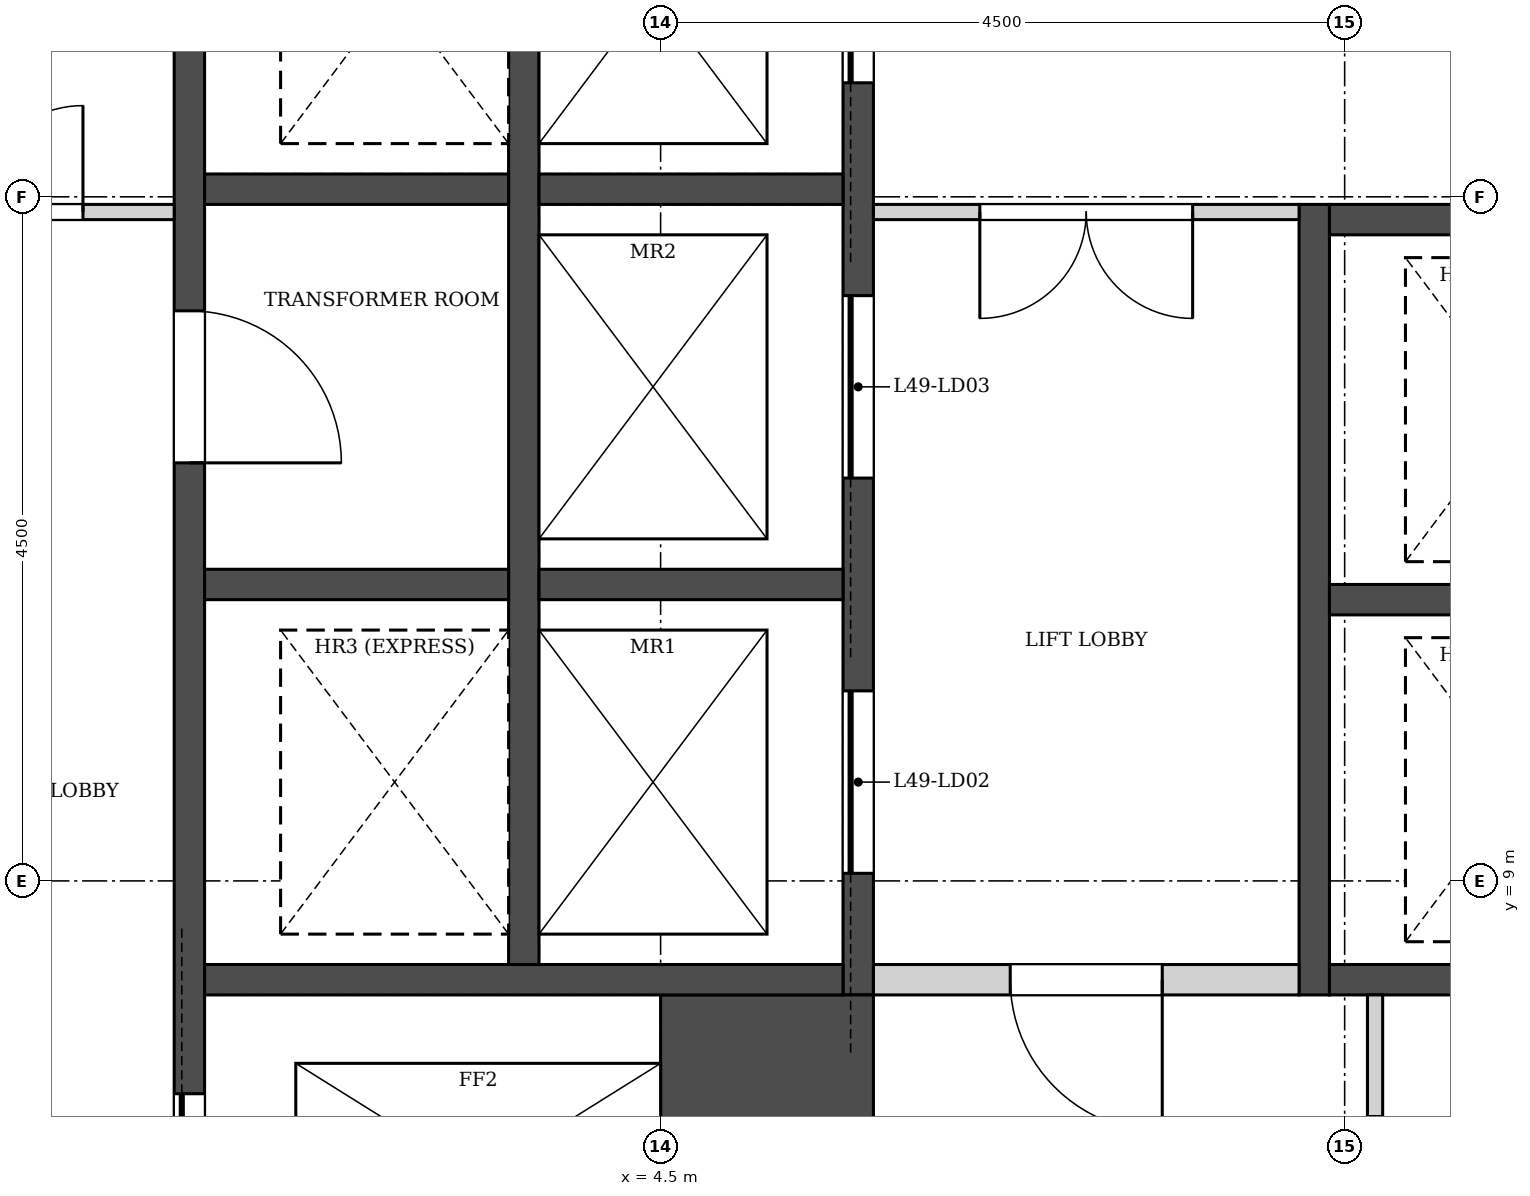
"""IFC4 building model, lengths in metres.
Left out: names, types, materials, properties, quantities, classifications, styles, units other than length and angle.
Written with IfcOpenShell. Run it as: python <this file> out.ifc"""

import sys

from ifc_helpers import new_model, si_unit, direction, frame, frame_2d, origin, place, context, subcontext, project, spatial, rectangle, extrude, element, fill, save


model = new_model("IFC4")
c1 = context("Model", 3, precision=1e-05, world=origin(), true_north=direction((0.0, 1.0)))
c2 = subcontext(c1, "Body", "Model", "MODEL_VIEW")
j1 = project(units=[si_unit("LENGTHUNIT", "METRE"), si_unit("PLANEANGLEUNIT", "RADIAN")], contexts=[c1])
p1 = place(None, origin())
s1 = spatial("IfcSite", under=j1, at=p1, CompositionType="ELEMENT")
p2 = place(p1, origin())
s2 = spatial("IfcBuilding", under=s1, at=p2, CompositionType="ELEMENT")
p3 = place(p2, frame((0.0, 0.0, 218.1)))
s3 = spatial("IfcBuildingStorey", under=s2, at=p3, CompositionType="ELEMENT", Elevation=218.1)
p4 = place(p3, frame((13.167, 10.695, 0.0), z_axis=(0.0, 0.0, 1.0), x_axis=(-0.499995021168, 0.866028278295, 0.0)))
e1 = element("IfcWall", 1, at=p4, inside=s3, PredefinedType="SHEAR", context=c2, shape_type="SweptSolid", body=[
    extrude(rectangle(XDim=8.839, YDim=1.0, at=frame_2d((4.419, 0.0))), origin(), (0.0, 0.0, 1.0), 5.4),
])
p5 = place(p3, frame((27.139, 7.709, 0.0), z_axis=(0.0, 0.0, 1.0), x_axis=(-0.500000533701, 0.866025095652, 0.0)))
e2 = element("IfcWall", 2, at=p5, inside=s3, PredefinedType="SOLIDWALL", context=c2, shape_type="SweptSolid", body=[
    extrude(rectangle(XDim=45.573, YDim=0.34, at=frame_2d((22.787, 0.0))), origin(), (0.0, 0.0, 1.0), 5.0),
])
p6 = place(p5, frame((1.893, 0.0, 0.9)))
e3 = element("IfcOpeningElement", 3, at=p6, cuts=e2, PredefinedType="OPENING", context=c2, shape_type="SweptSolid", body=[
    extrude(rectangle(XDim=1.885, YDim=3.0, at=frame_2d((0.942, 1.5))), frame((0.0, 0.18, 0.0), z_axis=(0.0, -1.0, 0.0), x_axis=(1.0, 0.0, 0.0)), (0.0, 0.0, 1.0), 0.36),
])
p7 = place(p5, frame((4.893, 0.0, 0.9)))
e4 = element("IfcOpeningElement", 4, at=p7, cuts=e2, PredefinedType="OPENING", context=c2, shape_type="SweptSolid", body=[
    extrude(rectangle(XDim=1.885, YDim=3.0, at=frame_2d((0.942, 1.5))), frame((0.0, 0.18, 0.0), z_axis=(0.0, -1.0, 0.0), x_axis=(1.0, 0.0, 0.0)), (0.0, 0.0, 1.0), 0.36),
])
p8 = place(p5, frame((7.893, 0.0, 0.9)))
e5 = element("IfcOpeningElement", 5, at=p8, cuts=e2, PredefinedType="OPENING", context=c2, shape_type="SweptSolid", body=[
    extrude(rectangle(XDim=1.885, YDim=3.0, at=frame_2d((0.942, 1.5))), frame((0.0, 0.18, 0.0), z_axis=(0.0, -1.0, 0.0), x_axis=(1.0, 0.0, 0.0)), (0.0, 0.0, 1.0), 0.36),
])
p9 = place(p5, frame((10.893, 0.0, 0.9)))
e6 = element("IfcOpeningElement", 6, at=p9, cuts=e2, PredefinedType="OPENING", context=c2, shape_type="SweptSolid", body=[
    extrude(rectangle(XDim=1.885, YDim=3.0, at=frame_2d((0.942, 1.5))), frame((0.0, 0.18, 0.0), z_axis=(0.0, -1.0, 0.0), x_axis=(1.0, 0.0, 0.0)), (0.0, 0.0, 1.0), 0.36),
])
p10 = place(p5, frame((13.893, 0.0, 0.9)))
e7 = element("IfcOpeningElement", 7, at=p10, cuts=e2, PredefinedType="OPENING", context=c2, shape_type="SweptSolid", body=[
    extrude(rectangle(XDim=1.885, YDim=3.0, at=frame_2d((0.942, 1.5))), frame((0.0, 0.18, 0.0), z_axis=(0.0, -1.0, 0.0), x_axis=(1.0, 0.0, 0.0)), (0.0, 0.0, 1.0), 0.36),
])
p11 = place(p5, frame((16.893, 0.0, 0.9)))
e8 = element("IfcOpeningElement", 8, at=p11, cuts=e2, PredefinedType="OPENING", context=c2, shape_type="SweptSolid", body=[
    extrude(rectangle(XDim=1.885, YDim=3.0, at=frame_2d((0.942, 1.5))), frame((0.0, 0.18, 0.0), z_axis=(0.0, -1.0, 0.0), x_axis=(1.0, 0.0, 0.0)), (0.0, 0.0, 1.0), 0.36),
])
p12 = place(p5, frame((19.893, 0.0, 0.9)))
e9 = element("IfcOpeningElement", 9, at=p12, cuts=e2, PredefinedType="OPENING", context=c2, shape_type="SweptSolid", body=[
    extrude(rectangle(XDim=1.885, YDim=3.0, at=frame_2d((0.942, 1.5))), frame((0.0, 0.18, 0.0), z_axis=(0.0, -1.0, 0.0), x_axis=(1.0, 0.0, 0.0)), (0.0, 0.0, 1.0), 0.36),
])
p13 = place(p5, frame((22.893, 0.0, 0.9)))
e10 = element("IfcOpeningElement", 10, at=p13, cuts=e2, PredefinedType="OPENING", context=c2, shape_type="SweptSolid", body=[
    extrude(rectangle(XDim=1.885, YDim=3.0, at=frame_2d((0.942, 1.5))), frame((0.0, 0.18, 0.0), z_axis=(0.0, -1.0, 0.0), x_axis=(1.0, 0.0, 0.0)), (0.0, 0.0, 1.0), 0.36),
])
p14 = place(p5, frame((25.893, 0.0, 0.9)))
e11 = element("IfcOpeningElement", 11, at=p14, cuts=e2, PredefinedType="OPENING", context=c2, shape_type="SweptSolid", body=[
    extrude(rectangle(XDim=1.885, YDim=3.0, at=frame_2d((0.942, 1.5))), frame((0.0, 0.18, 0.0), z_axis=(0.0, -1.0, 0.0), x_axis=(1.0, 0.0, 0.0)), (0.0, 0.0, 1.0), 0.36),
])
p15 = place(p5, frame((28.893, 0.0, 0.9)))
e12 = element("IfcOpeningElement", 12, at=p15, cuts=e2, PredefinedType="OPENING", context=c2, shape_type="SweptSolid", body=[
    extrude(rectangle(XDim=1.885, YDim=3.0, at=frame_2d((0.942, 1.5))), frame((0.0, 0.18, 0.0), z_axis=(0.0, -1.0, 0.0), x_axis=(1.0, 0.0, 0.0)), (0.0, 0.0, 1.0), 0.36),
])
p16 = place(p5, frame((31.893, 0.0, 0.9)))
e13 = element("IfcOpeningElement", 13, at=p16, cuts=e2, PredefinedType="OPENING", context=c2, shape_type="SweptSolid", body=[
    extrude(rectangle(XDim=1.885, YDim=3.0, at=frame_2d((0.942, 1.5))), frame((0.0, 0.18, 0.0), z_axis=(0.0, -1.0, 0.0), x_axis=(1.0, 0.0, 0.0)), (0.0, 0.0, 1.0), 0.36),
])
p17 = place(p5, frame((34.893, 0.0, 0.9)))
e14 = element("IfcOpeningElement", 14, at=p17, cuts=e2, PredefinedType="OPENING", context=c2, shape_type="SweptSolid", body=[
    extrude(rectangle(XDim=1.885, YDim=3.0, at=frame_2d((0.942, 1.5))), frame((0.0, 0.18, 0.0), z_axis=(0.0, -1.0, 0.0), x_axis=(1.0, 0.0, 0.0)), (0.0, 0.0, 1.0), 0.36),
])
p18 = place(p5, frame((37.893, 0.0, 0.9)))
e15 = element("IfcOpeningElement", 15, at=p18, cuts=e2, PredefinedType="OPENING", context=c2, shape_type="SweptSolid", body=[
    extrude(rectangle(XDim=1.885, YDim=3.0, at=frame_2d((0.942, 1.5))), frame((0.0, 0.18, 0.0), z_axis=(0.0, -1.0, 0.0), x_axis=(1.0, 0.0, 0.0)), (0.0, 0.0, 1.0), 0.36),
])
p19 = place(p5, frame((40.893, 0.0, 0.9)))
e16 = element("IfcOpeningElement", 16, at=p19, cuts=e2, PredefinedType="OPENING", context=c2, shape_type="SweptSolid", body=[
    extrude(rectangle(XDim=1.885, YDim=3.0, at=frame_2d((0.942, 1.5))), frame((0.0, 0.18, 0.0), z_axis=(0.0, -1.0, 0.0), x_axis=(1.0, 0.0, 0.0)), (0.0, 0.0, 1.0), 0.36),
])
p20 = place(p3, frame((8.8, 8.25, -0.4), z_axis=(0.0, 0.0, 1.0), x_axis=(0.0, 1.0, 0.0)))
e17 = element("IfcWall", 17, at=p20, inside=s3, PredefinedType="SOLIDWALL", context=c2, shape_type="SweptSolid", body=[
    extrude(rectangle(XDim=5.2, YDim=0.2, at=frame_2d((2.6, 0.0))), origin(), (0.0, 0.0, 1.0), 5.4),
])
p21 = place(p3, frame((5.8, 8.25, -0.4), z_axis=(0.0, 0.0, 1.0), x_axis=(0.0, 1.0, 0.0)))
e18 = element("IfcWall", 18, at=p21, inside=s3, PredefinedType="SOLIDWALL", context=c2, shape_type="SweptSolid", body=[
    extrude(rectangle(XDim=8.0, YDim=0.2, at=frame_2d((4.0, 0.0))), origin(), (0.0, 0.0, 1.0), 5.4),
])
p22 = place(p21, frame((0.8, 0.0, 0.4)))
e19 = element("IfcOpeningElement", 19, at=p22, cuts=e18, PredefinedType="OPENING", context=c2, shape_type="SweptSolid", body=[
    extrude(rectangle(XDim=1.2, YDim=2.1, at=frame_2d((0.6, 1.05))), frame((0.0, 0.11, 0.0), z_axis=(0.0, -1.0, 0.0), x_axis=(1.0, 0.0, 0.0)), (0.0, 0.0, 1.0), 0.22),
])
p23 = place(p21, frame((3.4, 0.0, 0.4)))
e20 = element("IfcOpeningElement", 20, at=p23, cuts=e18, PredefinedType="OPENING", context=c2, shape_type="SweptSolid", body=[
    extrude(rectangle(XDim=1.2, YDim=2.1, at=frame_2d((0.6, 1.05))), frame((0.0, 0.11, 0.0), z_axis=(0.0, -1.0, 0.0), x_axis=(1.0, 0.0, 0.0)), (0.0, 0.0, 1.0), 0.22),
])
p24 = place(p21, frame((6.0, 0.0, 0.4)))
e21 = element("IfcOpeningElement", 21, at=p24, cuts=e18, PredefinedType="OPENING", context=c2, shape_type="SweptSolid", body=[
    extrude(rectangle(XDim=1.2, YDim=2.1, at=frame_2d((0.6, 1.05))), frame((0.0, 0.11, 0.0), z_axis=(0.0, -1.0, 0.0), x_axis=(1.0, 0.0, 0.0)), (0.0, 0.0, 1.0), 0.22),
])
p25 = place(p3, frame((3.6, 8.45, -0.4), z_axis=(0.0, 0.0, 1.0), x_axis=(0.0, 1.0, 0.0)))
e22 = element("IfcWall", 22, at=p25, inside=s3, PredefinedType="SOLIDWALL", context=c2, shape_type="SweptSolid", body=[
    extrude(rectangle(XDim=7.8, YDim=0.2, at=frame_2d((3.9, 0.0))), origin(), (0.0, 0.0, 1.0), 5.4),
])
p26 = place(p3, frame((1.4, 5.85, -0.4), z_axis=(0.0, 0.0, 1.0), x_axis=(0.0, 1.0, 0.0)))
e23 = element("IfcWall", 23, at=p26, inside=s3, PredefinedType="SOLIDWALL", context=c2, shape_type="SweptSolid", body=[
    extrude(rectangle(XDim=11.75, YDim=0.2, at=frame_2d((5.875, 0.0))), origin(), (0.0, 0.0, 1.0), 5.4),
])
p27 = place(p26, frame((0.65, 0.0, 0.4)))
e24 = element("IfcOpeningElement", 24, at=p27, cuts=e23, PredefinedType="OPENING", context=c2, shape_type="SweptSolid", body=[
    extrude(rectangle(XDim=1.1, YDim=2.1, at=frame_2d((0.55, 1.05))), frame((0.0, 0.11, 0.0), z_axis=(0.0, -1.0, 0.0), x_axis=(1.0, 0.0, 0.0)), (0.0, 0.0, 1.0), 0.22),
])
p28 = place(p26, frame((5.9, 0.0, 0.4)))
e25 = element("IfcOpeningElement", 25, at=p28, cuts=e23, PredefinedType="OPENING", context=c2, shape_type="SweptSolid", body=[
    extrude(rectangle(XDim=1.0, YDim=2.1, at=frame_2d((0.5, 1.05))), frame((0.0, 0.11, 0.0), z_axis=(0.0, -1.0, 0.0), x_axis=(1.0, 0.0, 0.0)), (0.0, 0.0, 1.0), 0.22),
])
p29 = place(p3, frame((5.2, 5.85, -0.4), z_axis=(0.0, 0.0, 1.0), x_axis=(0.0, 1.0, 0.0)))
e26 = element("IfcWall", 26, at=p29, inside=s3, PredefinedType="SOLIDWALL", context=c2, shape_type="SweptSolid", body=[
    extrude(rectangle(XDim=2.4, YDim=1.4, at=frame_2d((1.2, 0.0))), origin(), (0.0, 0.0, 1.0), 5.4),
])
p30 = place(p3, frame((8.9, 8.35, -0.4), z_axis=(0.0, 0.0, 1.0), x_axis=(1.0, 0.0, 0.0)))
e27 = element("IfcWall", 27, at=p30, inside=s3, PredefinedType="SOLIDWALL", context=c2, shape_type="SweptSolid", body=[
    extrude(rectangle(XDim=2.0, YDim=0.2, at=frame_2d((1.0, 0.0))), origin(), (0.0, 0.0, 1.0), 5.4),
])
p31 = place(p3, frame((1.5, 8.35, -0.4), z_axis=(0.0, 0.0, 1.0), x_axis=(1.0, 0.0, 0.0)))
e28 = element("IfcWall", 28, at=p31, inside=s3, PredefinedType="SOLIDWALL", context=c2, shape_type="SweptSolid", body=[
    extrude(rectangle(XDim=4.2, YDim=0.2, at=frame_2d((2.1, 0.0))), origin(), (0.0, 0.0, 1.0), 5.4),
])
for number, where, z_axis, x_axis in (
    (29, (8.9, 10.85, -0.4), (0.0, 0.0, 1.0), (1.0, 0.0, 0.0)),
    (30, (8.9, 13.35, -0.4), (0.0, 0.0, 1.0), (1.0, 0.0, 0.0)),
    (31, (3.7, 10.95, -0.4), (0.0, 0.0, 1.0), (1.0, 0.0, 0.0)),
    (32, (3.7, 13.55, -0.4), (0.0, 0.0, 1.0), (1.0, 0.0, 0.0)),
    (33, (1.5, 10.95, -0.4), (0.0, 0.0, 1.0), (1.0, 0.0, 0.0)),
    (34, (1.5, 13.55, -0.4), (0.0, 0.0, 1.0), (1.0, 0.0, 0.0)),
):
    element("IfcWall", number, at=place(p3, frame(where, z_axis=z_axis, x_axis=x_axis)), inside=s3, PredefinedType="SOLIDWALL", context=c2, shape_type="SweptSolid", body=[
        extrude(rectangle(XDim=2.0, YDim=0.2, at=frame_2d((1.0, 0.0))), origin(), (0.0, 0.0, 1.0), 5.4),
    ])
p32 = place(p3, frame((5.9, 13.4, 0.0), z_axis=(0.0, 0.0, 1.0), x_axis=(1.0, 0.0, 0.0)))
e35 = element("IfcWall", 35, at=p32, inside=s3, PredefinedType="PARTITIONING", context=c2, shape_type="SweptSolid", body=[
    extrude(rectangle(XDim=2.8, YDim=0.1, at=frame_2d((1.4, 0.0))), origin(), (0.0, 0.0, 1.0), 5.0),
])
p33 = place(p32, frame((0.7, 0.0, 0.0)))
e36 = element("IfcOpeningElement", 36, at=p33, cuts=e35, PredefinedType="OPENING", context=c2, shape_type="SweptSolid", body=[
    extrude(rectangle(XDim=1.4, YDim=2.1, at=frame_2d((0.7, 1.05))), frame((0.0, 0.06, 0.0), z_axis=(0.0, -1.0, 0.0), x_axis=(1.0, 0.0, 0.0)), (0.0, 0.0, 1.0), 0.12),
])
p34 = place(p3, frame((9.2, 5.85, 0.0), z_axis=(0.0, 0.0, 1.0), x_axis=(0.0, 1.0, 0.0)))
e37 = element("IfcWall", 37, at=p34, inside=s3, PredefinedType="PARTITIONING", context=c2, shape_type="SweptSolid", body=[
    extrude(rectangle(XDim=2.4, YDim=0.1, at=frame_2d((1.2, 0.0))), origin(), (0.0, 0.0, 1.0), 5.0),
])
p35 = place(p34, frame((0.7, 0.0, 0.0)))
e38 = element("IfcOpeningElement", 38, at=p35, cuts=e37, PredefinedType="OPENING", context=c2, shape_type="SweptSolid", body=[
    extrude(rectangle(XDim=0.9, YDim=2.1, at=frame_2d((0.45, 1.05))), frame((0.0, 0.06, 0.0), z_axis=(0.0, -1.0, 0.0), x_axis=(1.0, 0.0, 0.0)), (0.0, 0.0, 1.0), 0.12),
])
p36 = place(p3, frame((5.9, 8.35, 0.0), z_axis=(0.0, 0.0, 1.0), x_axis=(1.0, 0.0, 0.0)))
e39 = element("IfcWall", 39, at=p36, inside=s3, PredefinedType="SOLIDWALL", context=c2, shape_type="SweptSolid", body=[
    extrude(rectangle(XDim=2.8, YDim=0.2, at=frame_2d((1.4, 0.0))), origin(), (0.0, 0.0, 1.0), 5.0),
])
p37 = place(p36, frame((0.9, 0.0, 0.0)))
e40 = element("IfcOpeningElement", 40, at=p37, cuts=e39, PredefinedType="OPENING", context=c2, shape_type="SweptSolid", body=[
    extrude(rectangle(XDim=1.0, YDim=2.1, at=frame_2d((0.5, 1.05))), frame((0.0, 0.11, 0.0), z_axis=(0.0, -1.0, 0.0), x_axis=(1.0, 0.0, 0.0)), (0.0, 0.0, 1.0), 0.22),
])
p38 = place(p3, frame((-1.3, 13.4, 0.0), z_axis=(0.0, 0.0, 1.0), x_axis=(1.0, 0.0, 0.0)))
e41 = element("IfcWall", 41, at=p38, inside=s3, PredefinedType="PARTITIONING", context=c2, shape_type="SweptSolid", body=[
    extrude(rectangle(XDim=2.6, YDim=0.1, at=frame_2d((1.3, 0.0))), origin(), (0.0, 0.0, 1.0), 5.0),
])
p39 = place(p38, frame((0.6, 0.0, 0.0)))
e42 = element("IfcOpeningElement", 42, at=p39, cuts=e41, PredefinedType="OPENING", context=c2, shape_type="SweptSolid", body=[
    extrude(rectangle(XDim=1.4, YDim=2.1, at=frame_2d((0.7, 1.05))), frame((0.0, 0.06, 0.0), z_axis=(0.0, -1.0, 0.0), x_axis=(1.0, 0.0, 0.0)), (0.0, 0.0, 1.0), 0.12),
])
p40 = place(p22, origin())
e43 = element("IfcDoor", 43, at=p40, inside=s3, OperationType="SLIDING_TO_LEFT", PredefinedType="DOOR", context=c2, shape_type="SweptSolid", body=[
    extrude(rectangle(XDim=1.2, YDim=2.1, at=frame_2d((0.6, 1.05))), frame((0.0, 0.025, 0.0), z_axis=(0.0, -1.0, 0.0), x_axis=(1.0, 0.0, 0.0)), (0.0, 0.0, 1.0), 0.05),
])
fill(e19, e43)
p41 = place(p23, origin())
e44 = element("IfcDoor", 44, at=p41, inside=s3, OperationType="SLIDING_TO_LEFT", PredefinedType="DOOR", context=c2, shape_type="SweptSolid", body=[
    extrude(rectangle(XDim=1.2, YDim=2.1, at=frame_2d((0.6, 1.05))), frame((0.0, 0.025, 0.0), z_axis=(0.0, -1.0, 0.0), x_axis=(1.0, 0.0, 0.0)), (0.0, 0.0, 1.0), 0.05),
])
fill(e20, e44)
p42 = place(p24, origin())
e45 = element("IfcDoor", 45, at=p42, inside=s3, OperationType="SLIDING_TO_LEFT", PredefinedType="DOOR", context=c2, shape_type="SweptSolid", body=[
    extrude(rectangle(XDim=1.2, YDim=2.1, at=frame_2d((0.6, 1.05))), frame((0.0, 0.025, 0.0), z_axis=(0.0, -1.0, 0.0), x_axis=(1.0, 0.0, 0.0)), (0.0, 0.0, 1.0), 0.05),
])
fill(e21, e45)
p43 = place(p27, origin())
e46 = element("IfcDoor", 46, at=p43, inside=s3, OperationType="SLIDING_TO_RIGHT", PredefinedType="DOOR", context=c2, shape_type="SweptSolid", body=[
    extrude(rectangle(XDim=1.1, YDim=2.1, at=frame_2d((0.55, 1.05))), frame((0.0, 0.025, 0.0), z_axis=(0.0, -1.0, 0.0), x_axis=(1.0, 0.0, 0.0)), (0.0, 0.0, 1.0), 0.05),
])
fill(e24, e46)
p44 = place(p28, frame((1.0, 0.0, 0.0), z_axis=(0.0, 0.0, 1.0), x_axis=(-1.0, 0.0, 0.0)))
e47 = element("IfcDoor", 47, at=p44, inside=s3, OperationType="SINGLE_SWING_RIGHT", PredefinedType="DOOR", context=c2, shape_type="SweptSolid", body=[
    extrude(rectangle(XDim=1.0, YDim=2.1, at=frame_2d((0.5, 1.05))), frame((0.0, 0.025, 0.0), z_axis=(0.0, -1.0, 0.0), x_axis=(1.0, 0.0, 0.0)), (0.0, 0.0, 1.0), 0.05),
])
fill(e25, e47)
p45 = place(p33, frame((1.4, 0.0, 0.0), z_axis=(0.0, 0.0, 1.0), x_axis=(-1.0, 0.0, 0.0)))
e48 = element("IfcDoor", 48, at=p45, inside=s3, OperationType="DOUBLE_DOOR_SINGLE_SWING", PredefinedType="DOOR", context=c2, shape_type="SweptSolid", body=[
    extrude(rectangle(XDim=1.4, YDim=2.1, at=frame_2d((0.7, 1.05))), frame((0.0, 0.025, 0.0), z_axis=(0.0, -1.0, 0.0), x_axis=(1.0, 0.0, 0.0)), (0.0, 0.0, 1.0), 0.05),
])
fill(e36, e48)
p46 = place(p37, frame((1.0, 0.0, 0.0), z_axis=(0.0, 0.0, 1.0), x_axis=(-1.0, 0.0, 0.0)))
e49 = element("IfcDoor", 49, at=p46, inside=s3, OperationType="SINGLE_SWING_LEFT", PredefinedType="DOOR", context=c2, shape_type="SweptSolid", body=[
    extrude(rectangle(XDim=1.0, YDim=2.1, at=frame_2d((0.5, 1.05))), frame((0.0, 0.025, 0.0), z_axis=(0.0, -1.0, 0.0), x_axis=(1.0, 0.0, 0.0)), (0.0, 0.0, 1.0), 0.05),
])
fill(e40, e49)
p47 = place(p39, origin())
e50 = element("IfcDoor", 50, at=p47, inside=s3, OperationType="DOUBLE_DOOR_SINGLE_SWING", PredefinedType="DOOR", context=c2, shape_type="SweptSolid", body=[
    extrude(rectangle(XDim=1.4, YDim=2.1, at=frame_2d((0.7, 1.05))), frame((0.0, 0.025, 0.0), z_axis=(0.0, -1.0, 0.0), x_axis=(1.0, 0.0, 0.0)), (0.0, 0.0, 1.0), 0.05),
])
fill(e42, e50)
save(model, sys.argv[1])
